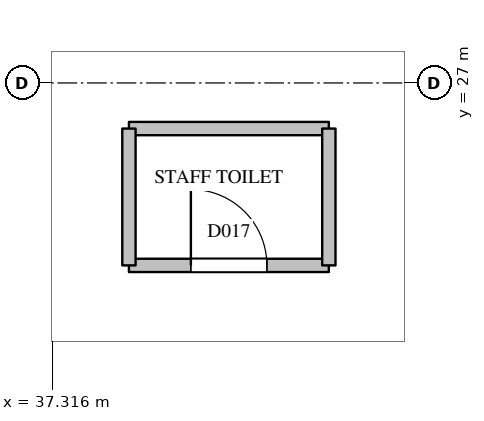
"""IFC4 building model, lengths in metres.
Left out: names, types, materials, properties, quantities, classifications, styles, units other than length and angle.
Written with IfcOpenShell. Run it as: python <this file> out.ifc"""

import sys

from ifc_helpers import new_model, si_unit, direction, frame, frame_2d, origin, place, context, subcontext, project, spatial, rectangle, extrude, element, fill, save


model = new_model("IFC4")
c1 = context("Model", 3, precision=1e-05, world=origin(), true_north=direction((0.0, 1.0)))
c2 = subcontext(c1, "Body", "Model", "MODEL_VIEW")
j1 = project(units=[si_unit("LENGTHUNIT", "METRE"), si_unit("PLANEANGLEUNIT", "RADIAN")], contexts=[c1])
p1 = place(None, origin())
s1 = spatial("IfcSite", under=j1, at=p1, CompositionType="ELEMENT")
p2 = place(p1, origin())
s2 = spatial("IfcBuilding", under=s1, at=p2, CompositionType="ELEMENT")
p3 = place(p2, frame((0.0, 0.0, 46.2)))
s3 = spatial("IfcBuildingStorey", under=s2, at=p3, CompositionType="ELEMENT", Elevation=46.2)
p4 = place(p3, frame((38.32, 24.6, 0.0), z_axis=(0.0, 0.0, 1.0), x_axis=(1.0, 0.0, 0.0)))
e1 = element("IfcWall", 1, at=p4, inside=s3, PredefinedType="PARTITIONING", context=c2, shape_type="SweptSolid", body=[
    extrude(rectangle(XDim=2.63, YDim=0.175, at=frame_2d((1.315, 0.0))), origin(), (0.0, 0.0, 1.0), 3.5),
])
p5 = place(p4, frame((0.815, 0.0, 0.0)))
e2 = element("IfcOpeningElement", 2, at=p5, cuts=e1, PredefinedType="OPENING", context=c2, shape_type="SweptSolid", body=[
    extrude(rectangle(XDim=1.0, YDim=2.1, at=frame_2d((0.5, 1.05))), frame((0.0, 0.097, 0.0), z_axis=(0.0, -1.0, 0.0), x_axis=(1.0, 0.0, 0.0)), (0.0, 0.0, 1.0), 0.195),
])
p6 = place(p3, frame((38.32, 26.4, 0.0), z_axis=(0.0, 0.0, 1.0), x_axis=(1.0, 0.0, 0.0)))
e3 = element("IfcWall", 3, at=p6, inside=s3, PredefinedType="PARTITIONING", context=c2, shape_type="SweptSolid", body=[
    extrude(rectangle(XDim=2.63, YDim=0.175, at=frame_2d((1.315, 0.0))), origin(), (0.0, 0.0, 1.0), 3.5),
])
for number, where, z_axis, x_axis in (
    (4, (38.32, 24.6, 0.0), (0.0, 0.0, 1.0), (0.0, 1.0, 0.0)),
    (5, (40.95, 24.6, 0.0), (0.0, 0.0, 1.0), (0.0, 1.0, 0.0)),
):
    element("IfcWall", number, at=place(p3, frame(where, z_axis=z_axis, x_axis=x_axis)), inside=s3, PredefinedType="PARTITIONING", context=c2, shape_type="SweptSolid", body=[
        extrude(rectangle(XDim=1.8, YDim=0.175, at=frame_2d((0.9, 0.0))), origin(), (0.0, 0.0, 1.0), 3.5),
    ])
p7 = place(p5, origin())
e6 = element("IfcDoor", 6, at=p7, inside=s3, OperationType="SINGLE_SWING_LEFT", PredefinedType="DOOR", context=c2, shape_type="SweptSolid", body=[
    extrude(rectangle(XDim=1.0, YDim=2.1, at=frame_2d((0.5, 1.05))), frame((0.0, 0.025, 0.0), z_axis=(0.0, -1.0, 0.0), x_axis=(1.0, 0.0, 0.0)), (0.0, 0.0, 1.0), 0.05),
])
fill(e2, e6)
save(model, sys.argv[1])
